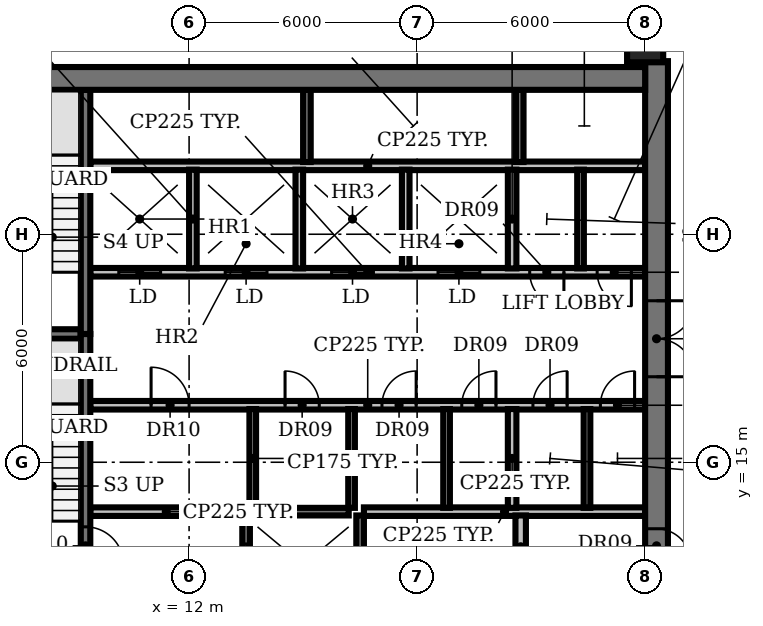
"""IFC4 building model, lengths in metres.
Left out: names, types, materials, properties, quantities, classifications, styles, units other than length and angle.
Written with IfcOpenShell. Run it as: python <this file> out.ifc"""

import sys

from ifc_helpers import new_model, si_unit, direction, frame, frame_2d, origin, origin_2d, place, context, subcontext, project, spatial, rectangle, circle, extrude, element, fill, save


model = new_model("IFC4")
c1 = context("Model", 3, precision=1e-05, world=origin(), true_north=direction((0.0, 1.0)))
c2 = subcontext(c1, "Body", "Model", "MODEL_VIEW")
j1 = project(units=[si_unit("LENGTHUNIT", "METRE"), si_unit("PLANEANGLEUNIT", "RADIAN")], contexts=[c1])
p1 = place(None, origin())
s1 = spatial("IfcSite", under=j1, at=p1, CompositionType="ELEMENT")
p2 = place(p1, origin())
s2 = spatial("IfcBuilding", under=s1, at=p2, CompositionType="ELEMENT")
p3 = place(p2, frame((0.0, 0.0, 167.6)))
s3 = spatial("IfcBuildingStorey", under=s2, at=p3, CompositionType="ELEMENT", Elevation=167.6)
p4 = place(p3, frame((24.0, 26.0, 0.0), z_axis=(0.0, 0.0, 1.0), x_axis=(1.0, 0.0, 0.0)))
e1 = element("IfcColumn", 1, at=p4, inside=s3, PredefinedType="COLUMN", context=c2, shape_type="SweptSolid", body=[
    extrude(circle(Radius=0.475, at=origin_2d()), origin(), (0.0, 0.0, 1.0), 3.85),
])
p5 = place(p3, frame((9.4, 13.7, 0.0), z_axis=(0.0, 0.0, 1.0), x_axis=(1.0, 0.0, 0.0)))
e2 = element("IfcWall", 2, at=p5, inside=s3, PredefinedType="PARTITIONING", context=c2, shape_type="SweptSolid", body=[
    extrude(rectangle(XDim=4.0, YDim=0.225, at=frame_2d((2.0, 0.0))), origin(), (0.0, 0.0, 1.0), 3.85),
])
p6 = place(p3, frame((13.75, 13.7, 0.0), z_axis=(0.0, 0.0, 1.0), x_axis=(1.0, 0.0, 0.0)))
e3 = element("IfcWall", 3, at=p6, inside=s3, PredefinedType="SHEAR", context=c2, shape_type="SweptSolid", body=[
    extrude(rectangle(XDim=2.45, YDim=0.2, at=frame_2d((1.225, 0.0))), origin(), (0.0, 0.0, 1.0), 3.85),
])
p7 = place(p3, frame((16.6, 13.7, 0.0), z_axis=(0.0, 0.0, 1.0), x_axis=(1.0, 0.0, 0.0)))
e4 = element("IfcWall", 4, at=p7, inside=s3, PredefinedType="PARTITIONING", context=c2, shape_type="SweptSolid", body=[
    extrude(rectangle(XDim=7.4, YDim=0.225, at=frame_2d((3.7, 0.0))), origin(), (0.0, 0.0, 1.0), 3.85),
])
p8 = place(p3, frame((9.4, 16.5, 0.0), z_axis=(0.0, 0.0, 1.0), x_axis=(1.0, 0.0, 0.0)))
e5 = element("IfcWall", 5, at=p8, inside=s3, PredefinedType="PARTITIONING", context=c2, shape_type="SweptSolid", body=[
    extrude(rectangle(XDim=14.6, YDim=0.225, at=frame_2d((7.3, 0.0))), origin(), (0.0, 0.0, 1.0), 3.85),
])
p9 = place(p8, frame((1.6, 0.0, 0.0)))
e6 = element("IfcOpeningElement", 6, at=p9, cuts=e5, PredefinedType="OPENING", context=c2, shape_type="SweptSolid", body=[
    extrude(rectangle(XDim=1.0, YDim=2.1, at=frame_2d((0.5, 1.05))), frame((0.0, 0.123, 0.0), z_axis=(0.0, -1.0, 0.0), x_axis=(1.0, 0.0, 0.0)), (0.0, 0.0, 1.0), 0.245),
])
p10 = place(p8, frame((5.125, 0.0, 0.0)))
e7 = element("IfcOpeningElement", 7, at=p10, cuts=e5, PredefinedType="OPENING", context=c2, shape_type="SweptSolid", body=[
    extrude(rectangle(XDim=0.9, YDim=2.1, at=frame_2d((0.45, 1.05))), frame((0.0, 0.123, 0.0), z_axis=(0.0, -1.0, 0.0), x_axis=(1.0, 0.0, 0.0)), (0.0, 0.0, 1.0), 0.245),
])
p11 = place(p8, frame((7.675, 0.0, 0.0)))
e8 = element("IfcOpeningElement", 8, at=p11, cuts=e5, PredefinedType="OPENING", context=c2, shape_type="SweptSolid", body=[
    extrude(rectangle(XDim=0.9, YDim=2.1, at=frame_2d((0.45, 1.05))), frame((0.0, 0.123, 0.0), z_axis=(0.0, -1.0, 0.0), x_axis=(1.0, 0.0, 0.0)), (0.0, 0.0, 1.0), 0.245),
])
p12 = place(p8, frame((9.775, 0.0, 0.0)))
e9 = element("IfcOpeningElement", 9, at=p12, cuts=e5, PredefinedType="OPENING", context=c2, shape_type="SweptSolid", body=[
    extrude(rectangle(XDim=0.9, YDim=2.1, at=frame_2d((0.45, 1.05))), frame((0.0, 0.123, 0.0), z_axis=(0.0, -1.0, 0.0), x_axis=(1.0, 0.0, 0.0)), (0.0, 0.0, 1.0), 0.245),
])
p13 = place(p8, frame((11.647, 0.0, 0.0)))
e10 = element("IfcOpeningElement", 10, at=p13, cuts=e5, PredefinedType="OPENING", context=c2, shape_type="SweptSolid", body=[
    extrude(rectangle(XDim=0.9, YDim=2.1, at=frame_2d((0.45, 1.05))), frame((0.0, 0.123, 0.0), z_axis=(0.0, -1.0, 0.0), x_axis=(1.0, 0.0, 0.0)), (0.0, 0.0, 1.0), 0.245),
])
p14 = place(p8, frame((13.423, 0.0, 0.0)))
e11 = element("IfcOpeningElement", 11, at=p14, cuts=e5, PredefinedType="OPENING", context=c2, shape_type="SweptSolid", body=[
    extrude(rectangle(XDim=0.9, YDim=2.1, at=frame_2d((0.45, 1.05))), frame((0.0, 0.123, 0.0), z_axis=(0.0, -1.0, 0.0), x_axis=(1.0, 0.0, 0.0)), (0.0, 0.0, 1.0), 0.245),
])
p15 = place(p3, frame((6.0, 18.375, 0.0), z_axis=(0.0, 0.0, 1.0), x_axis=(1.0, 0.0, 0.0)))
e12 = element("IfcWall", 12, at=p15, inside=s3, PredefinedType="SHEAR", context=c2, shape_type="SweptSolid", body=[
    extrude(rectangle(XDim=3.15, YDim=0.25, at=frame_2d((1.575, 0.0))), origin(), (0.0, 0.0, 1.0), 3.85),
])
p16 = place(p3, frame((24.0, 20.0, 0.0), z_axis=(0.0, 0.0, 1.0), x_axis=(-1.0, 0.0, 0.0)))
e13 = element("IfcWall", 13, at=p16, inside=s3, PredefinedType="PARTITIONING", context=c2, shape_type="SweptSolid", body=[
    extrude(rectangle(XDim=14.6, YDim=0.225, at=frame_2d((7.3, 0.0))), origin(), (0.0, 0.0, 1.0), 3.85),
])
p17 = place(p16, frame((12.75, 0.0, 0.0)))
e14 = element("IfcOpeningElement", 14, at=p17, cuts=e13, PredefinedType="OPENING", context=c2, shape_type="SweptSolid", body=[
    extrude(rectangle(XDim=1.1, YDim=2.1, at=frame_2d((0.55, 1.05))), frame((0.0, 0.123, 0.0), z_axis=(0.0, -1.0, 0.0), x_axis=(1.0, 0.0, 0.0)), (0.0, 0.0, 1.0), 0.245),
])
p18 = place(p16, frame((9.95, 0.0, 0.0)))
e15 = element("IfcOpeningElement", 15, at=p18, cuts=e13, PredefinedType="OPENING", context=c2, shape_type="SweptSolid", body=[
    extrude(rectangle(XDim=1.1, YDim=2.1, at=frame_2d((0.55, 1.05))), frame((0.0, 0.123, 0.0), z_axis=(0.0, -1.0, 0.0), x_axis=(1.0, 0.0, 0.0)), (0.0, 0.0, 1.0), 0.245),
])
p19 = place(p16, frame((7.15, 0.0, 0.0)))
e16 = element("IfcOpeningElement", 16, at=p19, cuts=e13, PredefinedType="OPENING", context=c2, shape_type="SweptSolid", body=[
    extrude(rectangle(XDim=1.1, YDim=2.1, at=frame_2d((0.55, 1.05))), frame((0.0, 0.123, 0.0), z_axis=(0.0, -1.0, 0.0), x_axis=(1.0, 0.0, 0.0)), (0.0, 0.0, 1.0), 0.245),
])
p20 = place(p16, frame((4.35, 0.0, 0.0)))
e17 = element("IfcOpeningElement", 17, at=p20, cuts=e13, PredefinedType="OPENING", context=c2, shape_type="SweptSolid", body=[
    extrude(rectangle(XDim=1.1, YDim=2.1, at=frame_2d((0.55, 1.05))), frame((0.0, 0.123, 0.0), z_axis=(0.0, -1.0, 0.0), x_axis=(1.0, 0.0, 0.0)), (0.0, 0.0, 1.0), 0.245),
])
p21 = place(p16, frame((2.137, 0.0, 0.0)))
e18 = element("IfcOpeningElement", 18, at=p21, cuts=e13, PredefinedType="OPENING", context=c2, shape_type="SweptSolid", body=[
    extrude(rectangle(XDim=0.9, YDim=2.1, at=frame_2d((0.45, 1.05))), frame((0.0, 0.123, 0.0), z_axis=(0.0, -1.0, 0.0), x_axis=(1.0, 0.0, 0.0)), (0.0, 0.0, 1.0), 0.245),
])
p22 = place(p16, frame((0.363, 0.0, 0.0)))
e19 = element("IfcOpeningElement", 19, at=p22, cuts=e13, PredefinedType="OPENING", context=c2, shape_type="SweptSolid", body=[
    extrude(rectangle(XDim=0.9, YDim=2.1, at=frame_2d((0.45, 1.05))), frame((0.0, 0.123, 0.0), z_axis=(0.0, -1.0, 0.0), x_axis=(1.0, 0.0, 0.0)), (0.0, 0.0, 1.0), 0.245),
])
p23 = place(p3, frame((9.4, 22.8, 0.0), z_axis=(0.0, 0.0, 1.0), x_axis=(1.0, 0.0, 0.0)))
e20 = element("IfcWall", 20, at=p23, inside=s3, PredefinedType="PARTITIONING", context=c2, shape_type="SweptSolid", body=[
    extrude(rectangle(XDim=14.6, YDim=0.225, at=frame_2d((7.3, 0.0))), origin(), (0.0, 0.0, 1.0), 3.85),
])
p24 = place(p3, frame((9.275, 18.375, 0.0), z_axis=(0.0, 0.0, 1.0), x_axis=(0.0, -1.0, 0.0)))
e21 = element("IfcWall", 21, at=p24, inside=s3, PredefinedType="SHEAR", context=c2, shape_type="SweptSolid", body=[
    extrude(rectangle(XDim=6.55, YDim=0.25, at=frame_2d((3.275, 0.0))), origin(), (0.0, 0.0, 1.0), 3.85),
])
p25 = place(p24, frame((5.075, 0.0, 0.0)))
e22 = element("IfcOpeningElement", 22, at=p25, cuts=e21, PredefinedType="OPENING", context=c2, shape_type="SweptSolid", body=[
    extrude(rectangle(XDim=1.0, YDim=2.1, at=frame_2d((0.5, 1.05))), frame((0.0, 0.135, 0.0), z_axis=(0.0, -1.0, 0.0), x_axis=(1.0, 0.0, 0.0)), (0.0, 0.0, 1.0), 0.27),
])
p26 = place(p3, frame((9.275, 18.375, 0.0), z_axis=(0.0, 0.0, 1.0), x_axis=(0.0, 1.0, 0.0)))
e23 = element("IfcWall", 23, at=p26, inside=s3, PredefinedType="SHEAR", context=c2, shape_type="SweptSolid", body=[
    extrude(rectangle(XDim=6.425, YDim=0.25, at=frame_2d((3.212, 0.0))), origin(), (0.0, 0.0, 1.0), 3.85),
])
p27 = place(p3, frame((12.1, 20.1, 0.0), z_axis=(0.0, 0.0, 1.0), x_axis=(0.0, 1.0, 0.0)))
e24 = element("IfcWall", 24, at=p27, inside=s3, PredefinedType="SOLIDWALL", context=c2, shape_type="SweptSolid", body=[
    extrude(rectangle(XDim=2.6, YDim=0.2, at=frame_2d((1.3, 0.0))), origin(), (0.0, 0.0, 1.0), 3.85),
])
p28 = place(p3, frame((13.5, 5.4, 0.0), z_axis=(0.0, 0.0, 1.0), x_axis=(0.0, 1.0, 0.0)))
e25 = element("IfcWall", 25, at=p28, inside=s3, PredefinedType="SHEAR", context=c2, shape_type="SweptSolid", body=[
    extrude(rectangle(XDim=8.2, YDim=0.2, at=frame_2d((4.1, 0.0))), origin(), (0.0, 0.0, 1.0), 3.85),
])
p29 = place(p28, frame((0.75, 0.0, 0.0)))
e26 = element("IfcOpeningElement", 26, at=p29, cuts=e25, PredefinedType="OPENING", context=c2, shape_type="SweptSolid", body=[
    extrude(rectangle(XDim=1.1, YDim=2.1, at=frame_2d((0.55, 1.05))), frame((0.0, 0.11, 0.0), z_axis=(0.0, -1.0, 0.0), x_axis=(1.0, 0.0, 0.0)), (0.0, 0.0, 1.0), 0.22),
])
p30 = place(p28, frame((3.55, 0.0, 0.0)))
e27 = element("IfcOpeningElement", 27, at=p30, cuts=e25, PredefinedType="OPENING", context=c2, shape_type="SweptSolid", body=[
    extrude(rectangle(XDim=1.1, YDim=2.1, at=frame_2d((0.55, 1.05))), frame((0.0, 0.11, 0.0), z_axis=(0.0, -1.0, 0.0), x_axis=(1.0, 0.0, 0.0)), (0.0, 0.0, 1.0), 0.22),
])
p31 = place(p28, frame((6.35, 0.0, 0.0)))
e28 = element("IfcOpeningElement", 28, at=p31, cuts=e25, PredefinedType="OPENING", context=c2, shape_type="SweptSolid", body=[
    extrude(rectangle(XDim=1.1, YDim=2.1, at=frame_2d((0.55, 1.05))), frame((0.0, 0.11, 0.0), z_axis=(0.0, -1.0, 0.0), x_axis=(1.0, 0.0, 0.0)), (0.0, 0.0, 1.0), 0.22),
])
p32 = place(p3, frame((13.675, 13.8, 0.0), z_axis=(0.0, 0.0, 1.0), x_axis=(0.0, 1.0, 0.0)))
e29 = element("IfcWall", 29, at=p32, inside=s3, PredefinedType="PARTITIONING", context=c2, shape_type="SweptSolid", body=[
    extrude(rectangle(XDim=2.6, YDim=0.175, at=frame_2d((1.3, 0.0))), origin(), (0.0, 0.0, 1.0), 3.85),
])
p33 = place(p3, frame((14.9, 20.1, 0.0), z_axis=(0.0, 0.0, 1.0), x_axis=(0.0, 1.0, 0.0)))
e30 = element("IfcWall", 30, at=p33, inside=s3, PredefinedType="SOLIDWALL", context=c2, shape_type="SweptSolid", body=[
    extrude(rectangle(XDim=2.6, YDim=0.2, at=frame_2d((1.3, 0.0))), origin(), (0.0, 0.0, 1.0), 3.85),
])
p34 = place(p3, frame((15.1, 22.9, 0.0), z_axis=(0.0, 0.0, 1.0), x_axis=(0.0, 1.0, 0.0)))
e31 = element("IfcWall", 31, at=p34, inside=s3, PredefinedType="SHEAR", context=c2, shape_type="SweptSolid", body=[
    extrude(rectangle(XDim=1.9, YDim=0.2, at=frame_2d((0.95, 0.0))), origin(), (0.0, 0.0, 1.0), 3.85),
])
p35 = place(p3, frame((16.275, 13.8, 0.0), z_axis=(0.0, 0.0, 1.0), x_axis=(0.0, 1.0, 0.0)))
e32 = element("IfcWall", 32, at=p35, inside=s3, PredefinedType="PARTITIONING", context=c2, shape_type="SweptSolid", body=[
    extrude(rectangle(XDim=2.6, YDim=0.175, at=frame_2d((1.3, 0.0))), origin(), (0.0, 0.0, 1.0), 3.85),
])
p36 = place(p3, frame((16.5, 5.4, 0.0), z_axis=(0.0, 0.0, 1.0), x_axis=(0.0, 1.0, 0.0)))
e33 = element("IfcWall", 33, at=p36, inside=s3, PredefinedType="SHEAR", context=c2, shape_type="SweptSolid", body=[
    extrude(rectangle(XDim=8.2, YDim=0.2, at=frame_2d((4.1, 0.0))), origin(), (0.0, 0.0, 1.0), 3.85),
])
p37 = place(p3, frame((17.7, 20.1, 0.0), z_axis=(0.0, 0.0, 1.0), x_axis=(0.0, 1.0, 0.0)))
e34 = element("IfcWall", 34, at=p37, inside=s3, PredefinedType="SOLIDWALL", context=c2, shape_type="SweptSolid", body=[
    extrude(rectangle(XDim=2.6, YDim=0.2, at=frame_2d((1.3, 0.0))), origin(), (0.0, 0.0, 1.0), 3.85),
])
p38 = place(p3, frame((18.775, 13.8, 0.0), z_axis=(0.0, 0.0, 1.0), x_axis=(0.0, 1.0, 0.0)))
e35 = element("IfcWall", 35, at=p38, inside=s3, PredefinedType="PARTITIONING", context=c2, shape_type="SweptSolid", body=[
    extrude(rectangle(XDim=2.6, YDim=0.175, at=frame_2d((1.3, 0.0))), origin(), (0.0, 0.0, 1.0), 3.85),
])
for number, where, z_axis, x_axis in (
    (36, (20.5, 13.8, 0.0), (0.0, 0.0, 1.0), (0.0, 1.0, 0.0)),
    (37, (20.5, 20.1, 0.0), (0.0, 0.0, 1.0), (0.0, 1.0, 0.0)),
):
    element("IfcWall", number, at=place(p3, frame(where, z_axis=z_axis, x_axis=x_axis)), inside=s3, PredefinedType="PARTITIONING", context=c2, shape_type="SweptSolid", body=[
        extrude(rectangle(XDim=2.6, YDim=0.225, at=frame_2d((1.3, 0.0))), origin(), (0.0, 0.0, 1.0), 3.85),
    ])
p39 = place(p3, frame((20.7, 22.9, 0.0), z_axis=(0.0, 0.0, 1.0), x_axis=(0.0, 1.0, 0.0)))
e38 = element("IfcWall", 38, at=p39, inside=s3, PredefinedType="SHEAR", context=c2, shape_type="SweptSolid", body=[
    extrude(rectangle(XDim=1.9, YDim=0.2, at=frame_2d((0.95, 0.0))), origin(), (0.0, 0.0, 1.0), 3.85),
])
p40 = place(p3, frame((20.725, 11.95, 0.0), z_axis=(0.0, 0.0, 1.0), x_axis=(0.0, 1.0, 0.0)))
e39 = element("IfcWall", 39, at=p40, inside=s3, PredefinedType="PARTITIONING", context=c2, shape_type="SweptSolid", body=[
    extrude(rectangle(XDim=1.65, YDim=0.275, at=frame_2d((0.825, 0.0))), origin(), (0.0, 0.0, 1.0), 3.85),
])
for number, where, z_axis, x_axis in (
    (40, (22.3, 20.1, 0.0), (0.0, 0.0, 1.0), (0.0, 1.0, 0.0)),
    (41, (22.47, 13.8, 0.0), (0.0, 0.0, 1.0), (0.0, 1.0, 0.0)),
):
    element("IfcWall", number, at=place(p3, frame(where, z_axis=z_axis, x_axis=x_axis)), inside=s3, PredefinedType="PARTITIONING", context=c2, shape_type="SweptSolid", body=[
        extrude(rectangle(XDim=2.6, YDim=0.175, at=frame_2d((1.3, 0.0))), origin(), (0.0, 0.0, 1.0), 3.85),
    ])
p41 = place(p3, frame((24.3, 25.555, 0.0), z_axis=(0.0, 0.0, 1.0), x_axis=(0.0, -1.0, 0.0)))
e42 = element("IfcWall", 42, at=p41, inside=s3, PredefinedType="SHEAR", context=c2, shape_type="SweptSolid", body=[
    extrude(rectangle(XDim=20.755, YDim=0.6, at=frame_2d((10.377, 0.0))), origin(), (0.0, 0.0, 1.0), 3.85),
])
p42 = place(p41, frame((18.405, 0.0, 0.0)))
e43 = element("IfcOpeningElement", 43, at=p42, cuts=e42, PredefinedType="OPENING", context=c2, shape_type="SweptSolid", body=[
    extrude(rectangle(XDim=1.5, YDim=2.1, at=frame_2d((0.75, 1.05))), frame((0.0, 0.31, 0.0), z_axis=(0.0, -1.0, 0.0), x_axis=(1.0, 0.0, 0.0)), (0.0, 0.0, 1.0), 0.62),
])
p43 = place(p41, frame((12.305, 0.0, 0.0)))
e44 = element("IfcOpeningElement", 44, at=p43, cuts=e42, PredefinedType="OPENING", context=c2, shape_type="SweptSolid", body=[
    extrude(rectangle(XDim=0.9, YDim=2.1, at=frame_2d((0.45, 1.05))), frame((0.0, 0.31, 0.0), z_axis=(0.0, -1.0, 0.0), x_axis=(1.0, 0.0, 0.0)), (0.0, 0.0, 1.0), 0.62),
])
p44 = place(p41, frame((6.305, 0.0, 0.0)))
e45 = element("IfcOpeningElement", 45, at=p44, cuts=e42, PredefinedType="OPENING", context=c2, shape_type="SweptSolid", body=[
    extrude(rectangle(XDim=2.0, YDim=2.1, at=frame_2d((1.0, 1.05))), frame((0.0, 0.31, 0.0), z_axis=(0.0, -1.0, 0.0), x_axis=(1.0, 0.0, 0.0)), (0.0, 0.0, 1.0), 0.62),
])
p45 = place(p3, frame((6.0, 25.1, 0.0), z_axis=(0.0, 0.0, 1.0), x_axis=(1.0, 0.0, 0.0)))
e46 = element("IfcWall", 46, at=p45, inside=s3, PredefinedType="SHEAR", context=c2, shape_type="SweptSolid", body=[
    extrude(rectangle(XDim=18.0, YDim=0.6, at=frame_2d((9.0, 0.0))), origin(), (0.0, 0.0, 1.0), 3.85),
])
p46 = place(p9, origin())
e47 = element("IfcDoor", 47, at=p46, inside=s3, OperationType="SINGLE_SWING_LEFT", PredefinedType="DOOR", context=c2, shape_type="SweptSolid", body=[
    extrude(rectangle(XDim=1.0, YDim=2.1, at=frame_2d((0.5, 1.05))), frame((0.0, 0.025, 0.0), z_axis=(0.0, -1.0, 0.0), x_axis=(1.0, 0.0, 0.0)), (0.0, 0.0, 1.0), 0.05),
])
fill(e6, e47)
p47 = place(p10, origin())
e48 = element("IfcDoor", 48, at=p47, inside=s3, OperationType="SINGLE_SWING_LEFT", PredefinedType="DOOR", context=c2, shape_type="SweptSolid", body=[
    extrude(rectangle(XDim=0.9, YDim=2.1, at=frame_2d((0.45, 1.05))), frame((0.0, 0.025, 0.0), z_axis=(0.0, -1.0, 0.0), x_axis=(1.0, 0.0, 0.0)), (0.0, 0.0, 1.0), 0.05),
])
fill(e7, e48)
p48 = place(p11, origin())
e49 = element("IfcDoor", 49, at=p48, inside=s3, OperationType="SINGLE_SWING_RIGHT", PredefinedType="DOOR", context=c2, shape_type="SweptSolid", body=[
    extrude(rectangle(XDim=0.9, YDim=2.1, at=frame_2d((0.45, 1.05))), frame((0.0, 0.025, 0.0), z_axis=(0.0, -1.0, 0.0), x_axis=(1.0, 0.0, 0.0)), (0.0, 0.0, 1.0), 0.05),
])
fill(e8, e49)
p49 = place(p12, origin())
e50 = element("IfcDoor", 50, at=p49, inside=s3, OperationType="SINGLE_SWING_RIGHT", PredefinedType="DOOR", context=c2, shape_type="SweptSolid", body=[
    extrude(rectangle(XDim=0.9, YDim=2.1, at=frame_2d((0.45, 1.05))), frame((0.0, 0.025, 0.0), z_axis=(0.0, -1.0, 0.0), x_axis=(1.0, 0.0, 0.0)), (0.0, 0.0, 1.0), 0.05),
])
fill(e9, e50)
p50 = place(p13, origin())
e51 = element("IfcDoor", 51, at=p50, inside=s3, OperationType="SINGLE_SWING_RIGHT", PredefinedType="DOOR", context=c2, shape_type="SweptSolid", body=[
    extrude(rectangle(XDim=0.9, YDim=2.1, at=frame_2d((0.45, 1.05))), frame((0.0, 0.025, 0.0), z_axis=(0.0, -1.0, 0.0), x_axis=(1.0, 0.0, 0.0)), (0.0, 0.0, 1.0), 0.05),
])
fill(e10, e51)
p51 = place(p14, origin())
e52 = element("IfcDoor", 52, at=p51, inside=s3, OperationType="SINGLE_SWING_RIGHT", PredefinedType="DOOR", context=c2, shape_type="SweptSolid", body=[
    extrude(rectangle(XDim=0.9, YDim=2.1, at=frame_2d((0.45, 1.05))), frame((0.0, 0.025, 0.0), z_axis=(0.0, -1.0, 0.0), x_axis=(1.0, 0.0, 0.0)), (0.0, 0.0, 1.0), 0.05),
])
fill(e11, e52)
p52 = place(p17, origin())
e53 = element("IfcDoor", 53, at=p52, inside=s3, OperationType="DOUBLE_DOOR_SLIDING", PredefinedType="DOOR", context=c2, shape_type="SweptSolid", body=[
    extrude(rectangle(XDim=1.1, YDim=2.1, at=frame_2d((0.55, 1.05))), frame((0.0, 0.025, 0.0), z_axis=(0.0, -1.0, 0.0), x_axis=(1.0, 0.0, 0.0)), (0.0, 0.0, 1.0), 0.05),
])
fill(e14, e53)
p53 = place(p18, origin())
e54 = element("IfcDoor", 54, at=p53, inside=s3, OperationType="DOUBLE_DOOR_SLIDING", PredefinedType="DOOR", context=c2, shape_type="SweptSolid", body=[
    extrude(rectangle(XDim=1.1, YDim=2.1, at=frame_2d((0.55, 1.05))), frame((0.0, 0.025, 0.0), z_axis=(0.0, -1.0, 0.0), x_axis=(1.0, 0.0, 0.0)), (0.0, 0.0, 1.0), 0.05),
])
fill(e15, e54)
p54 = place(p19, origin())
e55 = element("IfcDoor", 55, at=p54, inside=s3, OperationType="DOUBLE_DOOR_SLIDING", PredefinedType="DOOR", context=c2, shape_type="SweptSolid", body=[
    extrude(rectangle(XDim=1.1, YDim=2.1, at=frame_2d((0.55, 1.05))), frame((0.0, 0.025, 0.0), z_axis=(0.0, -1.0, 0.0), x_axis=(1.0, 0.0, 0.0)), (0.0, 0.0, 1.0), 0.05),
])
fill(e16, e55)
p55 = place(p20, origin())
e56 = element("IfcDoor", 56, at=p55, inside=s3, OperationType="DOUBLE_DOOR_SLIDING", PredefinedType="DOOR", context=c2, shape_type="SweptSolid", body=[
    extrude(rectangle(XDim=1.1, YDim=2.1, at=frame_2d((0.55, 1.05))), frame((0.0, 0.025, 0.0), z_axis=(0.0, -1.0, 0.0), x_axis=(1.0, 0.0, 0.0)), (0.0, 0.0, 1.0), 0.05),
])
fill(e17, e56)
p56 = place(p21, origin())
e57 = element("IfcDoor", 57, at=p56, inside=s3, OperationType="SINGLE_SWING_LEFT", PredefinedType="DOOR", context=c2, shape_type="SweptSolid", body=[
    extrude(rectangle(XDim=0.9, YDim=2.1, at=frame_2d((0.45, 1.05))), frame((0.0, 0.025, 0.0), z_axis=(0.0, -1.0, 0.0), x_axis=(1.0, 0.0, 0.0)), (0.0, 0.0, 1.0), 0.05),
])
fill(e18, e57)
p57 = place(p22, origin())
e58 = element("IfcDoor", 58, at=p57, inside=s3, OperationType="SINGLE_SWING_LEFT", PredefinedType="DOOR", context=c2, shape_type="SweptSolid", body=[
    extrude(rectangle(XDim=0.9, YDim=2.1, at=frame_2d((0.45, 1.05))), frame((0.0, 0.025, 0.0), z_axis=(0.0, -1.0, 0.0), x_axis=(1.0, 0.0, 0.0)), (0.0, 0.0, 1.0), 0.05),
])
fill(e19, e58)
p58 = place(p25, origin())
e59 = element("IfcDoor", 59, at=p58, inside=s3, OperationType="SINGLE_SWING_RIGHT", PredefinedType="DOOR", context=c2, shape_type="SweptSolid", body=[
    extrude(rectangle(XDim=1.0, YDim=2.1, at=frame_2d((0.5, 1.05))), frame((0.0, 0.025, 0.0), z_axis=(0.0, -1.0, 0.0), x_axis=(1.0, 0.0, 0.0)), (0.0, 0.0, 1.0), 0.05),
])
fill(e22, e59)
p59 = place(p31, origin())
e60 = element("IfcDoor", 60, at=p59, inside=s3, OperationType="DOUBLE_DOOR_SLIDING", PredefinedType="DOOR", context=c2, shape_type="SweptSolid", body=[
    extrude(rectangle(XDim=1.1, YDim=2.1, at=frame_2d((0.55, 1.05))), frame((0.0, 0.025, 0.0), z_axis=(0.0, -1.0, 0.0), x_axis=(1.0, 0.0, 0.0)), (0.0, 0.0, 1.0), 0.05),
])
fill(e28, e60)
p60 = place(p43, origin())
e61 = element("IfcDoor", 61, at=p60, inside=s3, OperationType="SINGLE_SWING_RIGHT", PredefinedType="DOOR", context=c2, shape_type="SweptSolid", body=[
    extrude(rectangle(XDim=0.9, YDim=2.1, at=frame_2d((0.45, 1.05))), frame((0.0, -0.24, 0.0), z_axis=(0.0, -1.0, 0.0), x_axis=(1.0, 0.0, 0.0)), (0.0, 0.0, 1.0), 0.05),
])
fill(e44, e61)
p61 = place(p44, origin())
e62 = element("IfcDoor", 62, at=p61, inside=s3, OperationType="DOUBLE_DOOR_SINGLE_SWING", PredefinedType="DOOR", context=c2, shape_type="SweptSolid", body=[
    extrude(rectangle(XDim=2.0, YDim=2.1, at=frame_2d((1.0, 1.05))), frame((0.0, 0.025, 0.0), z_axis=(0.0, -1.0, 0.0), x_axis=(1.0, 0.0, 0.0)), (0.0, 0.0, 1.0), 0.05),
])
fill(e45, e62)
save(model, sys.argv[1])
